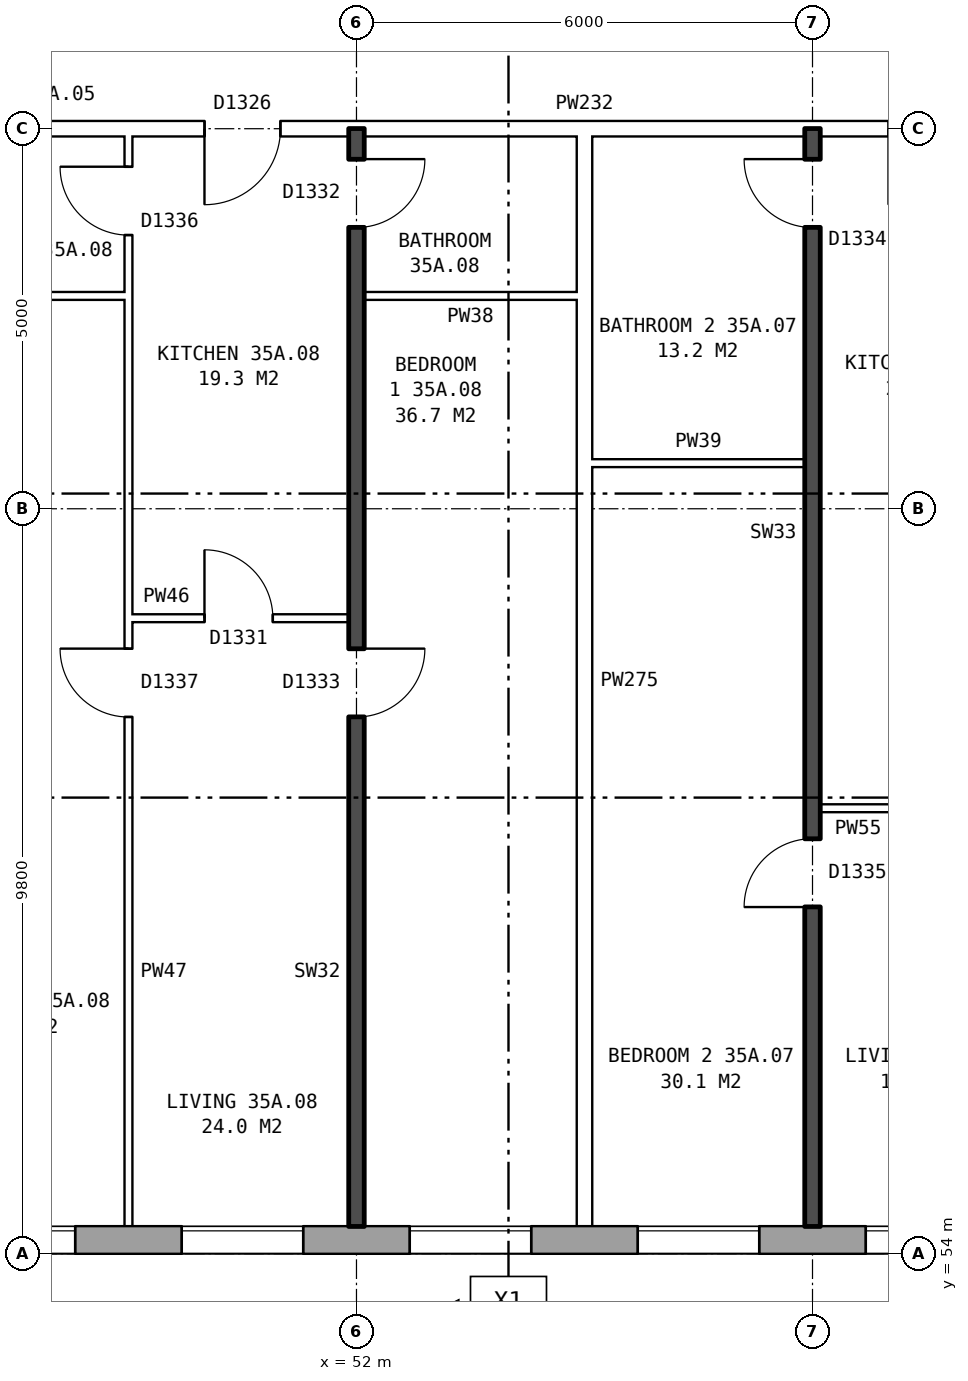
"""IFC4 building model, lengths in metres.
Left out: names, types, materials, properties, quantities, classifications, styles, units other than length and angle.
Written with IfcOpenShell. Run it as: python <this file> out.ifc"""

import sys

from ifc_helpers import new_model, si_unit, direction, frame, frame_2d, origin, place, context, subcontext, project, spatial, rectangle, extrude, element, fill, save


model = new_model("IFC4")
c1 = context("Model", 3, precision=1e-05, world=origin(), true_north=direction((0.0, 1.0)))
c2 = subcontext(c1, "Body", "Model", "MODEL_VIEW")
j1 = project(units=[si_unit("LENGTHUNIT", "METRE"), si_unit("PLANEANGLEUNIT", "RADIAN")], contexts=[c1])
p1 = place(None, origin())
s1 = spatial("IfcSite", under=j1, at=p1, CompositionType="ELEMENT")
p2 = place(p1, origin())
s2 = spatial("IfcBuilding", under=s1, at=p2, CompositionType="ELEMENT")
p3 = place(p2, frame((0.0, 0.0, 126.8)))
s3 = spatial("IfcBuildingStorey", under=s2, at=p3, CompositionType="ELEMENT", Elevation=126.8)
p4 = place(p3, frame((29.825, 54.18, 0.0), z_axis=(0.0, 0.0, 1.0), x_axis=(1.0, 0.0, 0.0)))
e1 = element("IfcWall", 1, at=p4, inside=s3, PredefinedType="STANDARD", context=c2, shape_type="SweptSolid", body=[
    extrude(rectangle(XDim=43.101, YDim=0.36, at=frame_2d((21.55, 0.0))), origin(), (0.0, 0.0, 1.0), 2.85),
])
p5 = place(p4, frame((1.875, 0.0, 0.8)))
e2 = element("IfcOpeningElement", 2, at=p5, cuts=e1, PredefinedType="OPENING", context=c2, shape_type="SweptSolid", body=[
    extrude(rectangle(XDim=1.6, YDim=1.8, at=frame_2d((0.8, 0.9))), frame((0.0, 0.19, 0.0), z_axis=(0.0, -1.0, 0.0), x_axis=(1.0, 0.0, 0.0)), (0.0, 0.0, 1.0), 0.38),
])
p6 = place(p4, frame((4.375, 0.0, 0.8)))
e3 = element("IfcOpeningElement", 3, at=p6, cuts=e1, PredefinedType="OPENING", context=c2, shape_type="SweptSolid", body=[
    extrude(rectangle(XDim=1.0, YDim=1.8, at=frame_2d((0.5, 0.9))), frame((0.0, 0.19, 0.0), z_axis=(0.0, -1.0, 0.0), x_axis=(1.0, 0.0, 0.0)), (0.0, 0.0, 1.0), 0.38),
])
p7 = place(p4, frame((5.675, 0.0, 1.6)))
e4 = element("IfcOpeningElement", 4, at=p7, cuts=e1, PredefinedType="OPENING", context=c2, shape_type="SweptSolid", body=[
    extrude(rectangle(XDim=0.6, YDim=0.9, at=frame_2d((0.3, 0.45))), frame((0.0, 0.19, 0.0), z_axis=(0.0, -1.0, 0.0), x_axis=(1.0, 0.0, 0.0)), (0.0, 0.0, 1.0), 0.38),
])
p8 = place(p4, frame((10.875, 0.0, 0.8)))
e5 = element("IfcOpeningElement", 5, at=p8, cuts=e1, PredefinedType="OPENING", context=c2, shape_type="SweptSolid", body=[
    extrude(rectangle(XDim=1.6, YDim=1.8, at=frame_2d((0.8, 0.9))), frame((0.0, 0.19, 0.0), z_axis=(0.0, -1.0, 0.0), x_axis=(1.0, 0.0, 0.0)), (0.0, 0.0, 1.0), 0.38),
])
p9 = place(p4, frame((13.875, 0.0, 0.8)))
e6 = element("IfcOpeningElement", 6, at=p9, cuts=e1, PredefinedType="OPENING", context=c2, shape_type="SweptSolid", body=[
    extrude(rectangle(XDim=1.6, YDim=1.8, at=frame_2d((0.8, 0.9))), frame((0.0, 0.19, 0.0), z_axis=(0.0, -1.0, 0.0), x_axis=(1.0, 0.0, 0.0)), (0.0, 0.0, 1.0), 0.38),
])
p10 = place(p4, frame((16.875, 0.0, 0.8)))
e7 = element("IfcOpeningElement", 7, at=p10, cuts=e1, PredefinedType="OPENING", context=c2, shape_type="SweptSolid", body=[
    extrude(rectangle(XDim=1.6, YDim=1.8, at=frame_2d((0.8, 0.9))), frame((0.0, 0.19, 0.0), z_axis=(0.0, -1.0, 0.0), x_axis=(1.0, 0.0, 0.0)), (0.0, 0.0, 1.0), 0.38),
])
p11 = place(p4, frame((19.875, 0.0, 0.8)))
e8 = element("IfcOpeningElement", 8, at=p11, cuts=e1, PredefinedType="OPENING", context=c2, shape_type="SweptSolid", body=[
    extrude(rectangle(XDim=1.6, YDim=1.8, at=frame_2d((0.8, 0.9))), frame((0.0, 0.19, 0.0), z_axis=(0.0, -1.0, 0.0), x_axis=(1.0, 0.0, 0.0)), (0.0, 0.0, 1.0), 0.38),
])
p12 = place(p4, frame((22.875, 0.0, 0.8)))
e9 = element("IfcOpeningElement", 9, at=p12, cuts=e1, PredefinedType="OPENING", context=c2, shape_type="SweptSolid", body=[
    extrude(rectangle(XDim=1.6, YDim=1.8, at=frame_2d((0.8, 0.9))), frame((0.0, 0.19, 0.0), z_axis=(0.0, -1.0, 0.0), x_axis=(1.0, 0.0, 0.0)), (0.0, 0.0, 1.0), 0.38),
])
p13 = place(p4, frame((25.875, 0.0, 0.8)))
e10 = element("IfcOpeningElement", 10, at=p13, cuts=e1, PredefinedType="OPENING", context=c2, shape_type="SweptSolid", body=[
    extrude(rectangle(XDim=1.6, YDim=1.8, at=frame_2d((0.8, 0.9))), frame((0.0, 0.19, 0.0), z_axis=(0.0, -1.0, 0.0), x_axis=(1.0, 0.0, 0.0)), (0.0, 0.0, 1.0), 0.38),
])
p14 = place(p4, frame((28.875, 0.0, 0.8)))
e11 = element("IfcOpeningElement", 11, at=p14, cuts=e1, PredefinedType="OPENING", context=c2, shape_type="SweptSolid", body=[
    extrude(rectangle(XDim=1.6, YDim=1.8, at=frame_2d((0.8, 0.9))), frame((0.0, 0.19, 0.0), z_axis=(0.0, -1.0, 0.0), x_axis=(1.0, 0.0, 0.0)), (0.0, 0.0, 1.0), 0.38),
])
p15 = place(p4, frame((31.875, 0.0, 0.8)))
e12 = element("IfcOpeningElement", 12, at=p15, cuts=e1, PredefinedType="OPENING", context=c2, shape_type="SweptSolid", body=[
    extrude(rectangle(XDim=1.6, YDim=1.8, at=frame_2d((0.8, 0.9))), frame((0.0, 0.19, 0.0), z_axis=(0.0, -1.0, 0.0), x_axis=(1.0, 0.0, 0.0)), (0.0, 0.0, 1.0), 0.38),
])
p16 = place(p4, frame((34.375, 0.0, 0.8)))
e13 = element("IfcOpeningElement", 13, at=p16, cuts=e1, PredefinedType="OPENING", context=c2, shape_type="SweptSolid", body=[
    extrude(rectangle(XDim=1.2, YDim=0.9, at=frame_2d((0.6, 0.45))), frame((0.0, 0.19, 0.0), z_axis=(0.0, -1.0, 0.0), x_axis=(1.0, 0.0, 0.0)), (0.0, 0.0, 1.0), 0.38),
])
p17 = place(p4, frame((37.875, 0.0, 0.8)))
e14 = element("IfcOpeningElement", 14, at=p17, cuts=e1, PredefinedType="OPENING", context=c2, shape_type="SweptSolid", body=[
    extrude(rectangle(XDim=1.6, YDim=1.8, at=frame_2d((0.8, 0.9))), frame((0.0, 0.19, 0.0), z_axis=(0.0, -1.0, 0.0), x_axis=(1.0, 0.0, 0.0)), (0.0, 0.0, 1.0), 0.38),
])
p18 = place(p4, frame((40.875, 0.0, 0.8)))
e15 = element("IfcOpeningElement", 15, at=p18, cuts=e1, PredefinedType="OPENING", context=c2, shape_type="SweptSolid", body=[
    extrude(rectangle(XDim=1.6, YDim=1.8, at=frame_2d((0.8, 0.9))), frame((0.0, 0.19, 0.0), z_axis=(0.0, -1.0, 0.0), x_axis=(1.0, 0.0, 0.0)), (0.0, 0.0, 1.0), 0.38),
])
p19 = place(p4, frame((7.525, 0.0, 0.8)))
e16 = element("IfcOpeningElement", 16, at=p19, cuts=e1, PredefinedType="OPENING", context=c2, shape_type="SweptSolid", body=[
    extrude(rectangle(XDim=0.6, YDim=0.9, at=frame_2d((0.3, 0.45))), frame((0.0, 0.19, 0.0), z_axis=(0.0, -1.0, 0.0), x_axis=(1.0, 0.0, 0.0)), (0.0, 0.0, 1.0), 0.38),
])
p20 = place(p4, frame((8.525, 0.0, 0.8)))
e17 = element("IfcOpeningElement", 17, at=p20, cuts=e1, PredefinedType="OPENING", context=c2, shape_type="SweptSolid", body=[
    extrude(rectangle(XDim=1.4, YDim=1.8, at=frame_2d((0.7, 0.9))), frame((0.0, 0.19, 0.0), z_axis=(0.0, -1.0, 0.0), x_axis=(1.0, 0.0, 0.0)), (0.0, 0.0, 1.0), 0.38),
])
p21 = place(p4, frame((36.725, 0.0, 1.7)))
e18 = element("IfcOpeningElement", 18, at=p21, cuts=e1, PredefinedType="OPENING", context=c2, shape_type="SweptSolid", body=[
    extrude(rectangle(XDim=0.8, YDim=0.9, at=frame_2d((0.4, 0.45))), frame((0.0, 0.19, 0.0), z_axis=(0.0, -1.0, 0.0), x_axis=(1.0, 0.0, 0.0)), (0.0, 0.0, 1.0), 0.38),
])
p22 = place(p3, frame((58.1, 59.86, 0.0), z_axis=(0.0, 0.0, 1.0), x_axis=(1.0, 0.0, 0.0)))
e19 = element("IfcWall", 19, at=p22, inside=s3, PredefinedType="PARTITIONING", context=c2, shape_type="SweptSolid", body=[
    extrude(rectangle(XDim=2.9, YDim=0.1, at=frame_2d((1.45, 0.0))), origin(), (0.0, 0.0, 1.0), 2.85),
])
p23 = place(p22, frame((1.0, 0.0, 0.0)))
e20 = element("IfcOpeningElement", 20, at=p23, cuts=e19, PredefinedType="OPENING", context=c2, shape_type="SweptSolid", body=[
    extrude(rectangle(XDim=0.9, YDim=2.1, at=frame_2d((0.45, 1.05))), frame((0.0, 0.06, 0.0), z_axis=(0.0, -1.0, 0.0), x_axis=(1.0, 0.0, 0.0)), (0.0, 0.0, 1.0), 0.12),
])
p24 = place(p3, frame((49.0, 62.36, 0.0), z_axis=(0.0, 0.0, 1.0), x_axis=(1.0, 0.0, 0.0)))
e21 = element("IfcWall", 21, at=p24, inside=s3, PredefinedType="PARTITIONING", context=c2, shape_type="SweptSolid", body=[
    extrude(rectangle(XDim=2.9, YDim=0.1, at=frame_2d((1.45, 0.0))), origin(), (0.0, 0.0, 1.0), 2.85),
])
p25 = place(p24, frame((1.0, 0.0, 0.0)))
e22 = element("IfcOpeningElement", 22, at=p25, cuts=e21, PredefinedType="OPENING", context=c2, shape_type="SweptSolid", body=[
    extrude(rectangle(XDim=0.9, YDim=2.1, at=frame_2d((0.45, 1.05))), frame((0.0, 0.06, 0.0), z_axis=(0.0, -1.0, 0.0), x_axis=(1.0, 0.0, 0.0)), (0.0, 0.0, 1.0), 0.12),
])
p26 = place(p3, frame((55.1, 64.4, 0.0), z_axis=(0.0, 0.0, 1.0), x_axis=(1.0, 0.0, 0.0)))
e23 = element("IfcWall", 23, at=p26, inside=s3, PredefinedType="PARTITIONING", context=c2, shape_type="SweptSolid", body=[
    extrude(rectangle(XDim=2.8, YDim=0.1, at=frame_2d((1.4, 0.0))), origin(), (0.0, 0.0, 1.0), 2.85),
])
p27 = place(p3, frame((46.1, 66.6, 0.0), z_axis=(0.0, 0.0, 1.0), x_axis=(1.0, 0.0, 0.0)))
e24 = element("IfcWall", 24, at=p27, inside=s3, PredefinedType="PARTITIONING", context=c2, shape_type="SweptSolid", body=[
    extrude(rectangle(XDim=2.9, YDim=0.1, at=frame_2d((1.45, 0.0))), origin(), (0.0, 0.0, 1.0), 2.85),
])
p28 = place(p3, frame((52.1, 66.6, 0.0), z_axis=(0.0, 0.0, 1.0), x_axis=(1.0, 0.0, 0.0)))
e25 = element("IfcWall", 25, at=p28, inside=s3, PredefinedType="PARTITIONING", context=c2, shape_type="SweptSolid", body=[
    extrude(rectangle(XDim=2.8, YDim=0.1, at=frame_2d((1.4, 0.0))), origin(), (0.0, 0.0, 1.0), 2.85),
])
p29 = place(p3, frame((44.36, 68.8, 0.0), z_axis=(0.0, 0.0, 1.0), x_axis=(1.0, 0.0, 0.0)))
e26 = element("IfcWall", 26, at=p29, inside=s3, PredefinedType="PARTITIONING", context=c2, shape_type="SweptSolid", body=[
    extrude(rectangle(XDim=19.28, YDim=0.2, at=frame_2d((9.64, 0.0))), origin(), (0.0, 0.0, 1.0), 2.85),
])
p30 = place(p29, frame((14.64, 0.0, 0.0)))
e27 = element("IfcOpeningElement", 27, at=p30, cuts=e26, PredefinedType="OPENING", context=c2, shape_type="SweptSolid", body=[
    extrude(rectangle(XDim=1.0, YDim=2.1, at=frame_2d((0.5, 1.05))), frame((0.0, 0.11, 0.0), z_axis=(0.0, -1.0, 0.0), x_axis=(1.0, 0.0, 0.0)), (0.0, 0.0, 1.0), 0.22),
])
p31 = place(p29, frame((5.64, 0.0, 0.0)))
e28 = element("IfcOpeningElement", 28, at=p31, cuts=e26, PredefinedType="OPENING", context=c2, shape_type="SweptSolid", body=[
    extrude(rectangle(XDim=1.0, YDim=2.1, at=frame_2d((0.5, 1.05))), frame((0.0, 0.11, 0.0), z_axis=(0.0, -1.0, 0.0), x_axis=(1.0, 0.0, 0.0)), (0.0, 0.0, 1.0), 0.22),
])
p32 = place(p3, frame((49.0, 54.36, 0.0), z_axis=(0.0, 0.0, 1.0), x_axis=(0.0, 1.0, 0.0)))
e29 = element("IfcWall", 29, at=p32, inside=s3, PredefinedType="PARTITIONING", context=c2, shape_type="SweptSolid", body=[
    extrude(rectangle(XDim=14.34, YDim=0.1, at=frame_2d((7.17, 0.0))), origin(), (0.0, 0.0, 1.0), 2.85),
])
p33 = place(p32, frame((6.7, 0.0, 0.0)))
e30 = element("IfcOpeningElement", 30, at=p33, cuts=e29, PredefinedType="OPENING", context=c2, shape_type="SweptSolid", body=[
    extrude(rectangle(XDim=0.9, YDim=2.1, at=frame_2d((0.45, 1.05))), frame((0.0, 0.06, 0.0), z_axis=(0.0, -1.0, 0.0), x_axis=(1.0, 0.0, 0.0)), (0.0, 0.0, 1.0), 0.12),
])
p34 = place(p32, frame((13.04, 0.0, 0.0)))
e31 = element("IfcOpeningElement", 31, at=p34, cuts=e29, PredefinedType="OPENING", context=c2, shape_type="SweptSolid", body=[
    extrude(rectangle(XDim=0.9, YDim=2.1, at=frame_2d((0.45, 1.05))), frame((0.0, 0.06, 0.0), z_axis=(0.0, -1.0, 0.0), x_axis=(1.0, 0.0, 0.0)), (0.0, 0.0, 1.0), 0.12),
])
p35 = place(p3, frame((52.0, 54.36, 0.0), z_axis=(0.0, 0.0, 1.0), x_axis=(0.0, 1.0, 0.0)))
e32 = element("IfcWall", 32, at=p35, inside=s3, PredefinedType="SOLIDWALL", context=c2, shape_type="SweptSolid", body=[
    extrude(rectangle(XDim=14.44, YDim=0.2, at=frame_2d((7.22, 0.0))), origin(), (0.0, 0.0, 1.0), 2.85),
])
p36 = place(p35, frame((6.7, 0.0, 0.0)))
e33 = element("IfcOpeningElement", 33, at=p36, cuts=e32, PredefinedType="OPENING", context=c2, shape_type="SweptSolid", body=[
    extrude(rectangle(XDim=0.9, YDim=2.1, at=frame_2d((0.45, 1.05))), frame((0.0, 0.11, 0.0), z_axis=(0.0, -1.0, 0.0), x_axis=(1.0, 0.0, 0.0)), (0.0, 0.0, 1.0), 0.22),
])
p37 = place(p35, frame((13.14, 0.0, 0.0)))
e34 = element("IfcOpeningElement", 34, at=p37, cuts=e32, PredefinedType="OPENING", context=c2, shape_type="SweptSolid", body=[
    extrude(rectangle(XDim=0.9, YDim=2.1, at=frame_2d((0.45, 1.05))), frame((0.0, 0.11, 0.0), z_axis=(0.0, -1.0, 0.0), x_axis=(1.0, 0.0, 0.0)), (0.0, 0.0, 1.0), 0.22),
])
p38 = place(p3, frame((55.0, 54.36, 0.0), z_axis=(0.0, 0.0, 1.0), x_axis=(0.0, 1.0, 0.0)))
e35 = element("IfcWall", 35, at=p38, inside=s3, PredefinedType="PARTITIONING", context=c2, shape_type="SweptSolid", body=[
    extrude(rectangle(XDim=14.34, YDim=0.2, at=frame_2d((7.17, 0.0))), origin(), (0.0, 0.0, 1.0), 2.85),
])
p39 = place(p3, frame((58.0, 54.36, 0.0), z_axis=(0.0, 0.0, 1.0), x_axis=(0.0, 1.0, 0.0)))
e36 = element("IfcWall", 36, at=p39, inside=s3, PredefinedType="SOLIDWALL", context=c2, shape_type="SweptSolid", body=[
    extrude(rectangle(XDim=14.44, YDim=0.2, at=frame_2d((7.22, 0.0))), origin(), (0.0, 0.0, 1.0), 2.85),
])
p40 = place(p39, frame((4.2, 0.0, 0.0)))
e37 = element("IfcOpeningElement", 37, at=p40, cuts=e36, PredefinedType="OPENING", context=c2, shape_type="SweptSolid", body=[
    extrude(rectangle(XDim=0.9, YDim=2.1, at=frame_2d((0.45, 1.05))), frame((0.0, 0.11, 0.0), z_axis=(0.0, -1.0, 0.0), x_axis=(1.0, 0.0, 0.0)), (0.0, 0.0, 1.0), 0.22),
])
p41 = place(p39, frame((13.14, 0.0, 0.0)))
e38 = element("IfcOpeningElement", 38, at=p41, cuts=e36, PredefinedType="OPENING", context=c2, shape_type="SweptSolid", body=[
    extrude(rectangle(XDim=0.9, YDim=2.1, at=frame_2d((0.45, 1.05))), frame((0.0, 0.11, 0.0), z_axis=(0.0, -1.0, 0.0), x_axis=(1.0, 0.0, 0.0)), (0.0, 0.0, 1.0), 0.22),
])
p42 = place(p10, origin())
e39 = element("IfcWindow", 39, at=p42, inside=s3, PartitioningType="SINGLE_PANEL", PredefinedType="WINDOW", context=c2, shape_type="SweptSolid", body=[
    extrude(rectangle(XDim=1.6, YDim=1.8, at=frame_2d((0.8, 0.9))), frame((0.0, 0.15, 0.0), z_axis=(0.0, -1.0, 0.0), x_axis=(1.0, 0.0, 0.0)), (0.0, 0.0, 1.0), 0.06),
])
fill(e7, e39)
p43 = place(p11, origin())
e40 = element("IfcWindow", 40, at=p43, inside=s3, PartitioningType="SINGLE_PANEL", PredefinedType="WINDOW", context=c2, shape_type="SweptSolid", body=[
    extrude(rectangle(XDim=1.6, YDim=1.8, at=frame_2d((0.8, 0.9))), frame((0.0, 0.15, 0.0), z_axis=(0.0, -1.0, 0.0), x_axis=(1.0, 0.0, 0.0)), (0.0, 0.0, 1.0), 0.06),
])
fill(e8, e40)
p44 = place(p12, origin())
e41 = element("IfcWindow", 41, at=p44, inside=s3, PartitioningType="SINGLE_PANEL", PredefinedType="WINDOW", context=c2, shape_type="SweptSolid", body=[
    extrude(rectangle(XDim=1.6, YDim=1.8, at=frame_2d((0.8, 0.9))), frame((0.0, 0.15, 0.0), z_axis=(0.0, -1.0, 0.0), x_axis=(1.0, 0.0, 0.0)), (0.0, 0.0, 1.0), 0.06),
])
fill(e9, e41)
p45 = place(p13, origin())
e42 = element("IfcWindow", 42, at=p45, inside=s3, PartitioningType="SINGLE_PANEL", PredefinedType="WINDOW", context=c2, shape_type="SweptSolid", body=[
    extrude(rectangle(XDim=1.6, YDim=1.8, at=frame_2d((0.8, 0.9))), frame((0.0, 0.15, 0.0), z_axis=(0.0, -1.0, 0.0), x_axis=(1.0, 0.0, 0.0)), (0.0, 0.0, 1.0), 0.06),
])
fill(e10, e42)
p46 = place(p14, origin())
e43 = element("IfcWindow", 43, at=p46, inside=s3, PartitioningType="SINGLE_PANEL", PredefinedType="WINDOW", context=c2, shape_type="SweptSolid", body=[
    extrude(rectangle(XDim=1.6, YDim=1.8, at=frame_2d((0.8, 0.9))), frame((0.0, 0.15, 0.0), z_axis=(0.0, -1.0, 0.0), x_axis=(1.0, 0.0, 0.0)), (0.0, 0.0, 1.0), 0.06),
])
fill(e11, e43)
p47 = place(p40, origin())
e44 = element("IfcDoor", 44, at=p47, inside=s3, OperationType="SINGLE_SWING_LEFT", PredefinedType="DOOR", context=c2, shape_type="SweptSolid", body=[
    extrude(rectangle(XDim=0.9, YDim=2.1, at=frame_2d((0.45, 1.05))), frame((0.0, 0.025, 0.0), z_axis=(0.0, -1.0, 0.0), x_axis=(1.0, 0.0, 0.0)), (0.0, 0.0, 1.0), 0.05),
])
fill(e37, e44)
p48 = place(p41, origin())
e45 = element("IfcDoor", 45, at=p48, inside=s3, OperationType="SINGLE_SWING_RIGHT", PredefinedType="DOOR", context=c2, shape_type="SweptSolid", body=[
    extrude(rectangle(XDim=0.9, YDim=2.1, at=frame_2d((0.45, 1.05))), frame((0.0, 0.025, 0.0), z_axis=(0.0, -1.0, 0.0), x_axis=(1.0, 0.0, 0.0)), (0.0, 0.0, 1.0), 0.05),
])
fill(e38, e45)
p49 = place(p36, frame((0.9, 0.0, 0.0), z_axis=(0.0, 0.0, 1.0), x_axis=(-1.0, 0.0, 0.0)))
e46 = element("IfcDoor", 46, at=p49, inside=s3, OperationType="SINGLE_SWING_LEFT", PredefinedType="DOOR", context=c2, shape_type="SweptSolid", body=[
    extrude(rectangle(XDim=0.9, YDim=2.1, at=frame_2d((0.45, 1.05))), frame((0.0, 0.025, 0.0), z_axis=(0.0, -1.0, 0.0), x_axis=(1.0, 0.0, 0.0)), (0.0, 0.0, 1.0), 0.05),
])
fill(e33, e46)
p50 = place(p33, origin())
e47 = element("IfcDoor", 47, at=p50, inside=s3, OperationType="SINGLE_SWING_RIGHT", PredefinedType="DOOR", context=c2, shape_type="SweptSolid", body=[
    extrude(rectangle(XDim=0.9, YDim=2.1, at=frame_2d((0.45, 1.05))), frame((0.0, 0.025, 0.0), z_axis=(0.0, -1.0, 0.0), x_axis=(1.0, 0.0, 0.0)), (0.0, 0.0, 1.0), 0.05),
])
fill(e30, e47)
p51 = place(p31, frame((1.0, 0.0, 0.0), z_axis=(0.0, 0.0, 1.0), x_axis=(-1.0, 0.0, 0.0)))
e48 = element("IfcDoor", 48, at=p51, inside=s3, OperationType="SINGLE_SWING_RIGHT", PredefinedType="DOOR", context=c2, shape_type="SweptSolid", body=[
    extrude(rectangle(XDim=1.0, YDim=2.1, at=frame_2d((0.5, 1.05))), frame((0.0, 0.025, 0.0), z_axis=(0.0, -1.0, 0.0), x_axis=(1.0, 0.0, 0.0)), (0.0, 0.0, 1.0), 0.05),
])
fill(e28, e48)
p52 = place(p25, origin())
e49 = element("IfcDoor", 49, at=p52, inside=s3, OperationType="SINGLE_SWING_LEFT", PredefinedType="DOOR", context=c2, shape_type="SweptSolid", body=[
    extrude(rectangle(XDim=0.9, YDim=2.1, at=frame_2d((0.45, 1.05))), frame((0.0, 0.025, 0.0), z_axis=(0.0, -1.0, 0.0), x_axis=(1.0, 0.0, 0.0)), (0.0, 0.0, 1.0), 0.05),
])
fill(e22, e49)
p53 = place(p37, frame((0.9, 0.0, 0.0), z_axis=(0.0, 0.0, 1.0), x_axis=(-1.0, 0.0, 0.0)))
e50 = element("IfcDoor", 50, at=p53, inside=s3, OperationType="SINGLE_SWING_LEFT", PredefinedType="DOOR", context=c2, shape_type="SweptSolid", body=[
    extrude(rectangle(XDim=0.9, YDim=2.1, at=frame_2d((0.45, 1.05))), frame((0.0, 0.025, 0.0), z_axis=(0.0, -1.0, 0.0), x_axis=(1.0, 0.0, 0.0)), (0.0, 0.0, 1.0), 0.05),
])
fill(e34, e50)
p54 = place(p34, origin())
e51 = element("IfcDoor", 51, at=p54, inside=s3, OperationType="SINGLE_SWING_RIGHT", PredefinedType="DOOR", context=c2, shape_type="SweptSolid", body=[
    extrude(rectangle(XDim=0.9, YDim=2.1, at=frame_2d((0.45, 1.05))), frame((0.0, 0.025, 0.0), z_axis=(0.0, -1.0, 0.0), x_axis=(1.0, 0.0, 0.0)), (0.0, 0.0, 1.0), 0.05),
])
fill(e31, e51)
save(model, sys.argv[1])
